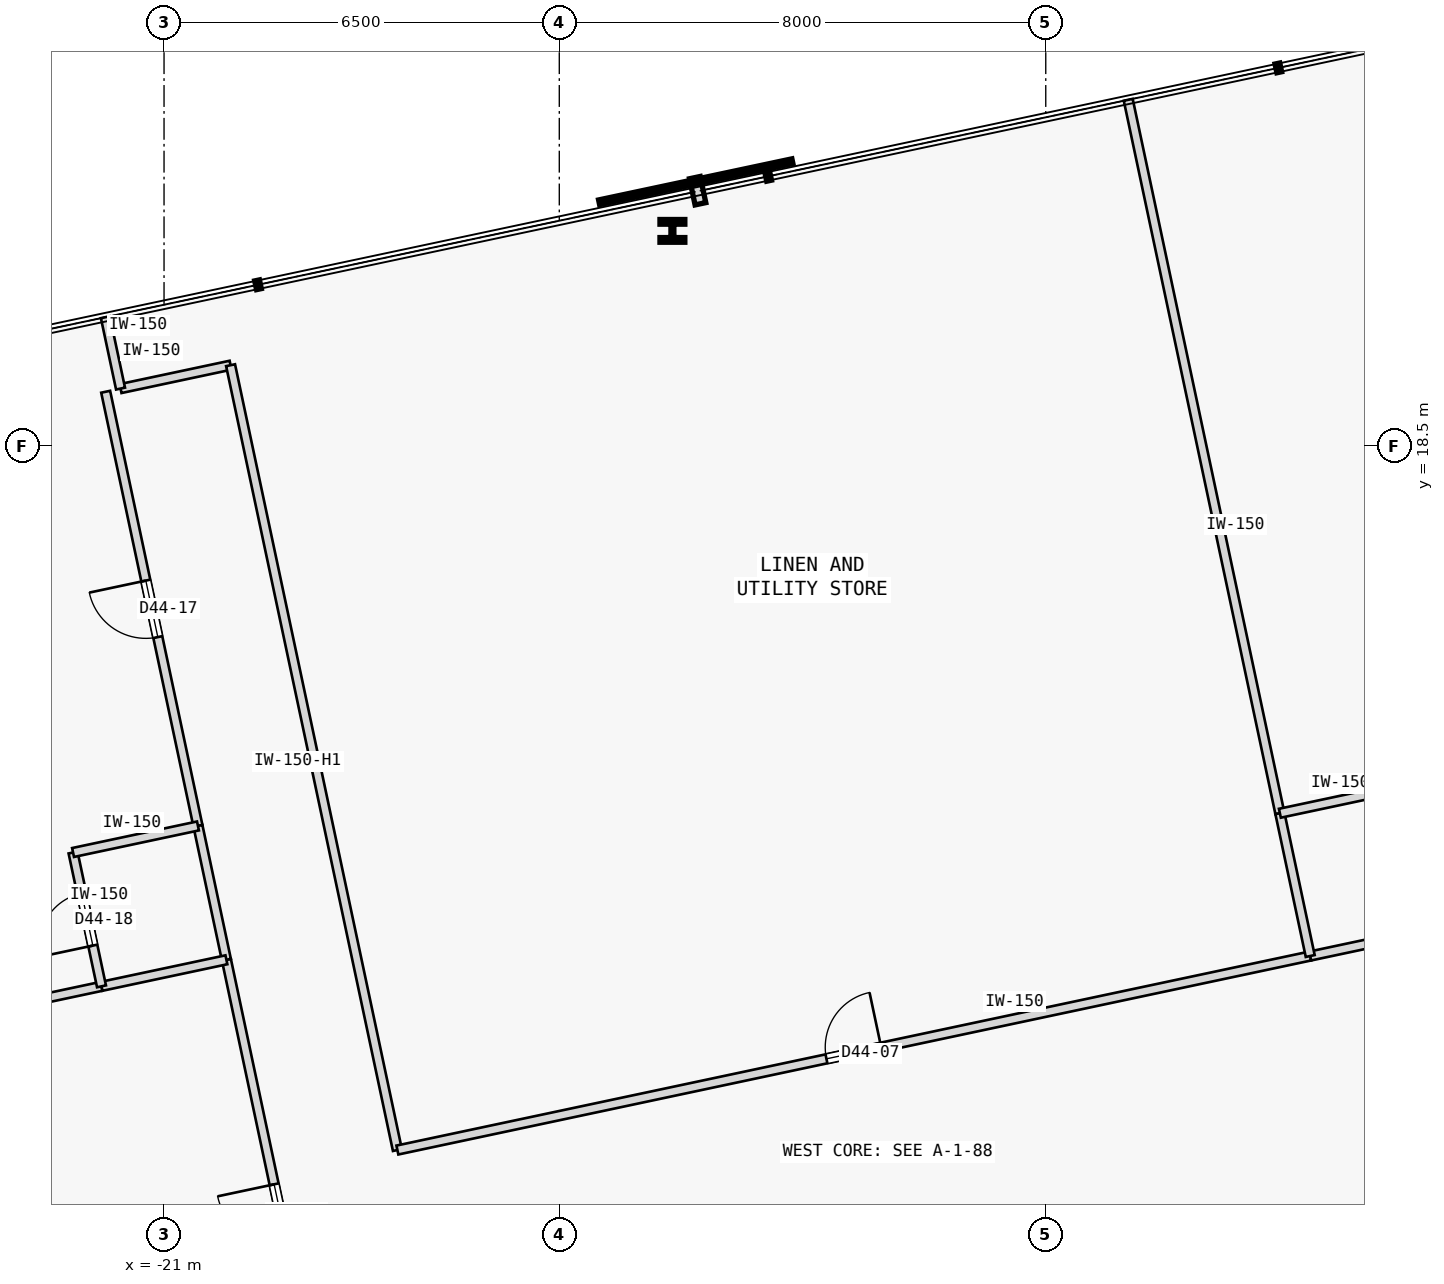
"""IFC4 building model, lengths in metres.
Left out: names, types, materials, properties, quantities, classifications, styles, units other than length and angle.
Written with IfcOpenShell. Run it as: python <this file> out.ifc"""

import sys

from ifc_helpers import new_model, si_unit, direction, frame, frame_2d, origin, origin_2d, place, context, subcontext, project, spatial, rectangle, i_section, extrude, element, fill, save


model = new_model("IFC4")
c1 = context("Model", 3, precision=1e-05, world=origin(), true_north=direction((0.0, 1.0)))
c2 = subcontext(c1, "Body", "Model", "MODEL_VIEW")
j1 = project(units=[si_unit("LENGTHUNIT", "METRE"), si_unit("PLANEANGLEUNIT", "RADIAN")], contexts=[c1])
p1 = place(None, origin())
s1 = spatial("IfcSite", under=j1, at=p1, CompositionType="ELEMENT")
p2 = place(p1, origin())
s2 = spatial("IfcBuilding", under=s1, at=p2, CompositionType="ELEMENT")
p3 = place(p2, frame((0.0, 0.0, 171.8)))
s3 = spatial("IfcBuildingStorey", under=s2, at=p3, CompositionType="ELEMENT", Elevation=171.8)
p4 = place(p3, frame((-12.64, 22.042, 0.0), z_axis=(0.0, 0.0, 1.0), x_axis=(1.0, 0.0, 0.0)))
e1 = element("IfcColumn", 1, at=p4, inside=s3, PredefinedType="COLUMN", context=c2, shape_type="SweptSolid", body=[
    extrude(i_section(OverallWidth=0.409, OverallDepth=0.374, WebThickness=0.048, FlangeThickness=0.077, FilletRadius=0.015, at=origin_2d()), origin(), (0.0, 0.0, 1.0), 3.4),
])
p5 = place(p3, frame((-21.715, 19.448, 0.0), z_axis=(0.0, 0.0, 1.0), x_axis=(0.978160192495, 0.207852442415, 0.0)))
e2 = element("IfcWall", 2, at=p5, inside=s3, PredefinedType="PARTITIONING", context=c2, shape_type="SweptSolid", body=[
    extrude(rectangle(XDim=1.85, YDim=0.15, at=frame_2d((0.925, 0.0))), origin(), (0.0, 0.0, 1.0), 3.175),
])
p6 = place(p3, frame((-17.162, 6.926, 0.0), z_axis=(0.0, 0.0, 1.0), x_axis=(-0.207911421929, 0.978147657888, 0.0)))
e3 = element("IfcWall", 3, at=p6, inside=s3, PredefinedType="PARTITIONING", context=c2, shape_type="SweptSolid", body=[
    extrude(rectangle(XDim=13.195, YDim=0.15, at=frame_2d((6.598, 0.0))), origin(), (0.0, 0.0, 1.0), 2.725),
])
p7 = place(p3, frame((-17.162, 6.926, 0.0), z_axis=(0.0, 0.0, 1.0), x_axis=(0.978145870853, 0.207919829103, 0.0)))
e4 = element("IfcWall", 4, at=p7, inside=s3, PredefinedType="PARTITIONING", context=c2, shape_type="SweptSolid", body=[
    extrude(rectangle(XDim=15.347, YDim=0.15, at=frame_2d((7.673, 0.0))), origin(), (0.0, 0.0, 1.0), 3.175),
])
p8 = place(p7, frame((7.213, 0.0, 0.0)))
e5 = element("IfcOpeningElement", 5, at=p8, cuts=e4, PredefinedType="OPENING", context=c2, shape_type="SweptSolid", body=[
    extrude(rectangle(XDim=0.92, YDim=2.15, at=frame_2d((0.46, 1.075))), frame((0.0, 0.085, 0.0), z_axis=(0.0, -1.0, 0.0), x_axis=(1.0, 0.0, 0.0)), (0.0, 0.0, 1.0), 0.17),
])
p9 = place(p3, frame((-2.151, 10.117, 0.0), z_axis=(0.0, 0.0, 1.0), x_axis=(0.978146728319, 0.207915795165, 0.0)))
e6 = element("IfcWall", 6, at=p9, inside=s3, PredefinedType="PARTITIONING", context=c2, shape_type="SweptSolid", body=[
    extrude(rectangle(XDim=2.15, YDim=0.15, at=frame_2d((1.075, 0.0))), origin(), (0.0, 0.0, 1.0), 3.175),
])
p10 = place(p3, frame((-18.207, 1.74, 0.0), z_axis=(0.0, 0.0, 1.0), x_axis=(-0.207922306475, 0.978145344246, 0.0)))
e7 = element("IfcWall", 7, at=p10, inside=s3, PredefinedType="PARTITIONING", context=c2, shape_type="SweptSolid", body=[
    extrude(rectangle(XDim=8.5, YDim=0.15, at=frame_2d((4.25, 0.0))), origin(), (0.0, 0.0, 1.0), 3.175),
])
p11 = place(p10, frame((3.775, 0.0, 0.0)))
e8 = element("IfcOpeningElement", 8, at=p11, cuts=e7, PredefinedType="OPENING", context=c2, shape_type="SweptSolid", body=[
    extrude(rectangle(XDim=0.95, YDim=2.15, at=frame_2d((0.475, 1.075))), frame((0.0, 0.085, 0.0), z_axis=(0.0, -1.0, 0.0), x_axis=(1.0, 0.0, 0.0)), (0.0, 0.0, 1.0), 0.17),
])
p12 = place(p3, frame((-20.442, 12.255, 0.0), z_axis=(0.0, 0.0, 1.0), x_axis=(-0.207916352354, 0.978146609882, 0.0)))
e9 = element("IfcWall", 9, at=p12, inside=s3, PredefinedType="PARTITIONING", context=c2, shape_type="SweptSolid", body=[
    extrude(rectangle(XDim=7.3, YDim=0.15, at=frame_2d((3.65, 0.0))), origin(), (0.0, 0.0, 1.0), 3.175),
])
p13 = place(p12, frame((3.175, 0.0, 0.0)))
e10 = element("IfcOpeningElement", 10, at=p13, cuts=e9, PredefinedType="OPENING", context=c2, shape_type="SweptSolid", body=[
    extrude(rectangle(XDim=0.95, YDim=2.15, at=frame_2d((0.475, 1.075))), frame((0.0, 0.085, 0.0), z_axis=(0.0, -1.0, 0.0), x_axis=(1.0, 0.0, 0.0)), (0.0, 0.0, 1.0), 0.17),
])
p14 = place(p3, frame((-19.974, 10.055, 0.0), z_axis=(0.0, 0.0, 1.0), x_axis=(-0.207913264065, 0.978147266328, 0.0)))
e11 = element("IfcWall", 11, at=p14, inside=s3, PredefinedType="PARTITIONING", context=c2, shape_type="SweptSolid", body=[
    extrude(rectangle(XDim=2.25, YDim=0.15, at=frame_2d((1.125, 0.0))), origin(), (0.0, 0.0, 1.0), 3.175),
])
p15 = place(p3, frame((-2.65, 12.464, 0.0), z_axis=(0.0, 0.0, 1.0), x_axis=(-0.207914988081, 0.978146899873, 0.0)))
e12 = element("IfcWall", 12, at=p15, inside=s3, PredefinedType="PARTITIONING", context=c2, shape_type="SweptSolid", body=[
    extrude(rectangle(XDim=11.995, YDim=0.15, at=frame_2d((5.998, 0.0))), origin(), (0.0, 0.0, 1.0), 3.175),
])
p16 = place(p3, frame((-2.151, 10.117, 0.0), z_axis=(0.0, 0.0, 1.0), x_axis=(-0.207917150959, 0.978146440129, 0.0)))
e13 = element("IfcWall", 13, at=p16, inside=s3, PredefinedType="PARTITIONING", context=c2, shape_type="SweptSolid", body=[
    extrude(rectangle(XDim=2.4, YDim=0.15, at=frame_2d((1.2, 0.0))), origin(), (0.0, 0.0, 1.0), 3.175),
])
p17 = place(p3, frame((-21.715, 19.448, 0.0), z_axis=(0.0, 0.0, 1.0), x_axis=(-0.20795853359, 0.978137642823, 0.0)))
e14 = element("IfcWall", 14, at=p17, inside=s3, PredefinedType="PARTITIONING", context=c2, shape_type="SweptSolid", body=[
    extrude(rectangle(XDim=1.2, YDim=0.15, at=frame_2d((0.6, 0.0))), origin(), (0.0, 0.0, 1.0), 3.175),
])
p18 = place(p3, frame((-2.65, 12.464, 0.0), z_axis=(0.0, 0.0, 1.0), x_axis=(0.978146728319, 0.207915795165, 0.0)))
e15 = element("IfcWall", 15, at=p18, inside=s3, PredefinedType="PARTITIONING", context=c2, shape_type="SweptSolid", body=[
    extrude(rectangle(XDim=2.15, YDim=0.15, at=frame_2d((1.075, 0.0))), origin(), (0.0, 0.0, 1.0), 3.175),
])
p19 = place(p3, frame((-37.403, 6.35, 0.0), z_axis=(0.0, 0.0, 1.0), x_axis=(0.978149296727, 0.207903711638, 0.0)))
e16 = element("IfcWall", 16, at=p19, inside=s3, PredefinedType="PARTITIONING", context=c2, shape_type="SweptSolid", body=[
    extrude(rectangle(XDim=15.718, YDim=0.15, at=frame_2d((7.859, 0.0))), origin(), (0.0, 0.0, 1.0), 3.175),
])
p20 = place(p3, frame((-22.029, 9.618, 0.0), z_axis=(0.0, 0.0, 1.0), x_axis=(0.978134617382, 0.207972763311, 0.0)))
e17 = element("IfcWall", 17, at=p20, inside=s3, PredefinedType="PARTITIONING", context=c2, shape_type="SweptSolid", body=[
    extrude(rectangle(XDim=2.1, YDim=0.15, at=frame_2d((1.05, 0.0))), origin(), (0.0, 0.0, 1.0), 3.175),
])
p21 = place(p3, frame((-22.029, 9.618, 0.0), z_axis=(0.0, 0.0, 1.0), x_axis=(-0.207891197838, 0.978151956427, 0.0)))
e18 = element("IfcWall", 18, at=p21, inside=s3, PredefinedType="PARTITIONING", context=c2, shape_type="SweptSolid", body=[
    extrude(rectangle(XDim=2.25, YDim=0.15, at=frame_2d((1.125, 0.0))), origin(), (0.0, 0.0, 1.0), 3.175),
])
p22 = place(p21, frame((0.685, 0.0, 0.0)))
e19 = element("IfcOpeningElement", 19, at=p22, cuts=e18, PredefinedType="OPENING", context=c2, shape_type="SweptSolid", body=[
    extrude(rectangle(XDim=0.88, YDim=2.15, at=frame_2d((0.44, 1.075))), frame((0.0, 0.085, 0.0), z_axis=(0.0, -1.0, 0.0), x_axis=(1.0, 0.0, 0.0)), (0.0, 0.0, 1.0), 0.17),
])
p23 = place(p3, frame((-22.496, 11.819, 0.0), z_axis=(0.0, 0.0, 1.0), x_axis=(0.97815826, 0.207861536591, 0.0)))
e20 = element("IfcWall", 20, at=p23, inside=s3, PredefinedType="PARTITIONING", context=c2, shape_type="SweptSolid", body=[
    extrude(rectangle(XDim=2.1, YDim=0.15, at=frame_2d((1.05, 0.0))), origin(), (0.0, 0.0, 1.0), 3.175),
])
p24 = place(p8, origin())
e21 = element("IfcDoor", 21, at=p24, inside=s3, OperationType="SINGLE_SWING_RIGHT", PredefinedType="DOOR", context=c2, shape_type="SweptSolid", body=[
    extrude(rectangle(XDim=0.92, YDim=2.15, at=frame_2d((0.46, 1.075))), frame((0.0, 0.025, 0.0), z_axis=(0.0, -1.0, 0.0), x_axis=(1.0, 0.0, 0.0)), (0.0, 0.0, 1.0), 0.05),
])
fill(e5, e21)
p25 = place(p11, origin())
e22 = element("IfcDoor", 22, at=p25, inside=s3, OperationType="SINGLE_SWING_RIGHT", PredefinedType="DOOR", context=c2, shape_type="SweptSolid", body=[
    extrude(rectangle(XDim=0.95, YDim=2.15, at=frame_2d((0.475, 1.075))), frame((0.0, 0.025, 0.0), z_axis=(0.0, -1.0, 0.0), x_axis=(1.0, 0.0, 0.0)), (0.0, 0.0, 1.0), 0.05),
])
fill(e8, e22)
p26 = place(p13, origin())
e23 = element("IfcDoor", 23, at=p26, inside=s3, OperationType="SINGLE_SWING_RIGHT", PredefinedType="DOOR", context=c2, shape_type="SweptSolid", body=[
    extrude(rectangle(XDim=0.95, YDim=2.15, at=frame_2d((0.475, 1.075))), frame((0.0, 0.025, 0.0), z_axis=(0.0, -1.0, 0.0), x_axis=(1.0, 0.0, 0.0)), (0.0, 0.0, 1.0), 0.05),
])
fill(e10, e23)
p27 = place(p22, origin())
e24 = element("IfcDoor", 24, at=p27, inside=s3, OperationType="SINGLE_SWING_LEFT", PredefinedType="DOOR", context=c2, shape_type="SweptSolid", body=[
    extrude(rectangle(XDim=0.88, YDim=2.15, at=frame_2d((0.44, 1.075))), frame((0.0, 0.025, 0.0), z_axis=(0.0, -1.0, 0.0), x_axis=(1.0, 0.0, 0.0)), (0.0, 0.0, 1.0), 0.05),
])
fill(e19, e24)
save(model, sys.argv[1])
